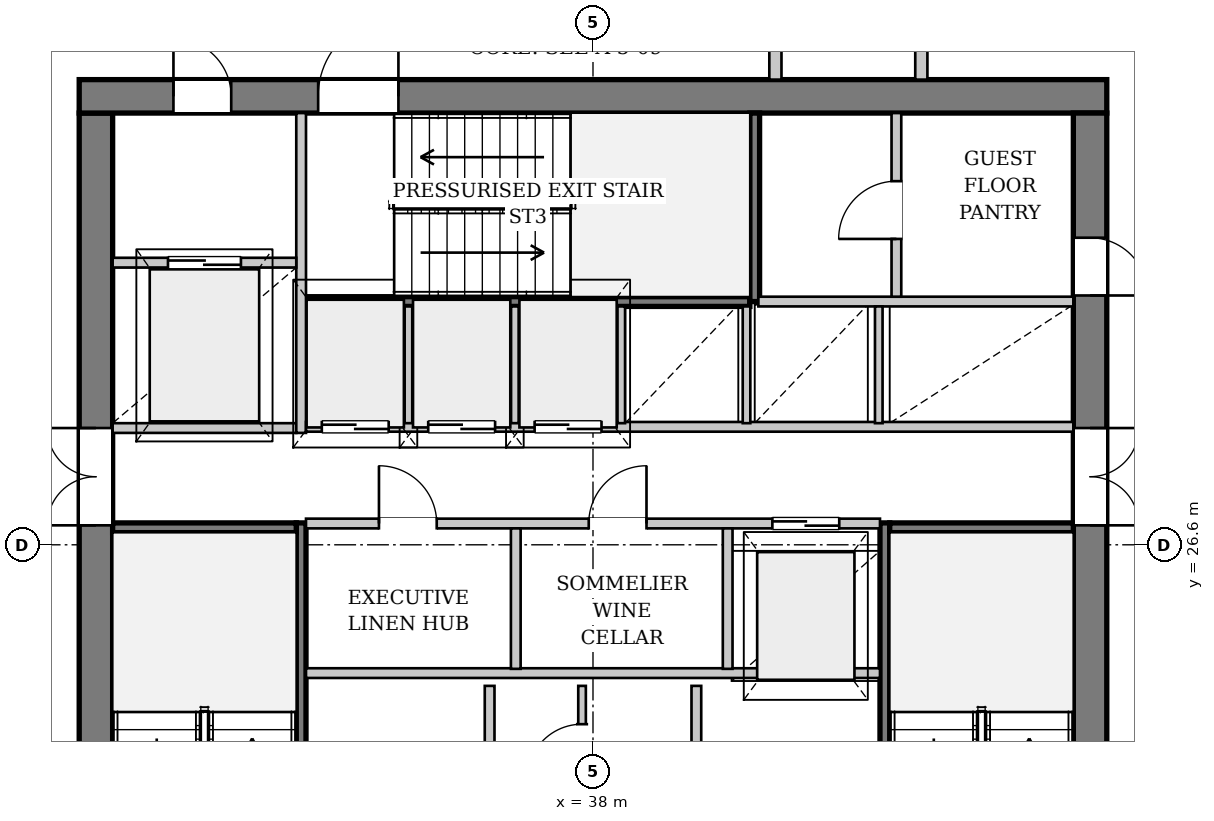
"""IFC4 building model, lengths in metres.
Left out: names, types, materials, properties, quantities, classifications, styles, units other than length and angle.
Written with IfcOpenShell. Run it as: python <this file> out.ifc"""

import sys

from ifc_helpers import new_model, si_unit, direction, frame, frame_2d, origin, place, context, subcontext, project, spatial, rectangle, extrude, source, transform, mapped, element, fill, save


model = new_model("IFC4")
c1 = context("Model", 3, precision=1e-05, world=origin(), true_north=direction((0.0, 1.0)))
c2 = subcontext(c1, "Body", "Model", "MODEL_VIEW")
j1 = project(units=[si_unit("LENGTHUNIT", "METRE"), si_unit("PLANEANGLEUNIT", "RADIAN")], contexts=[c1])
p1 = place(None, origin())
s1 = spatial("IfcSite", under=j1, at=p1, CompositionType="ELEMENT")
p2 = place(p1, origin())
s2 = spatial("IfcBuilding", under=s1, at=p2, CompositionType="ELEMENT")
p3 = place(p2, frame((0.0, 0.0, 185.65)))
s3 = spatial("IfcBuildingStorey", under=s2, at=p3, CompositionType="ELEMENT", Elevation=185.65)
p4 = place(p3, frame((29.825, 19.5, 0.0), z_axis=(0.0, 0.0, 1.0), x_axis=(0.0, 1.0, 0.0)))
e1 = element("IfcWall", 1, at=p4, inside=s3, PredefinedType="SHEAR", context=c2, shape_type="SweptSolid", body=[
    extrude(rectangle(XDim=14.2, YDim=0.55, at=frame_2d((7.1, 0.0))), origin(), (0.0, 0.0, 1.0), 3.33),
])
p5 = place(p4, frame((7.42, 0.0, 0.0)))
e2 = element("IfcOpeningElement", 2, at=p5, cuts=e1, PredefinedType="OPENING", context=c2, shape_type="SweptSolid", body=[
    extrude(rectangle(XDim=1.6, YDim=2.2, at=frame_2d((0.8, 1.1))), frame((0.0, 0.285, 0.0), z_axis=(0.0, -1.0, 0.0), x_axis=(1.0, 0.0, 0.0)), (0.0, 0.0, 1.0), 0.57),
])
p6 = place(p3, frame((29.55, 33.975, 0.0), z_axis=(0.0, 0.0, 1.0), x_axis=(1.0, 0.0, 0.0)))
e3 = element("IfcWall", 3, at=p6, inside=s3, PredefinedType="SHEAR", context=c2, shape_type="SweptSolid", body=[
    extrude(rectangle(XDim=16.9, YDim=0.55, at=frame_2d((8.45, 0.0))), origin(), (0.0, 0.0, 1.0), 3.33),
])
p7 = place(p6, frame((1.55, 0.0, 0.0)))
e4 = element("IfcOpeningElement", 4, at=p7, cuts=e3, PredefinedType="OPENING", context=c2, shape_type="SweptSolid", body=[
    extrude(rectangle(XDim=0.95, YDim=2.1, at=frame_2d((0.475, 1.05))), frame((0.0, 0.285, 0.0), z_axis=(0.0, -1.0, 0.0), x_axis=(1.0, 0.0, 0.0)), (0.0, 0.0, 1.0), 0.57),
])
p8 = place(p6, frame((3.93, 0.0, 0.0)))
e5 = element("IfcOpeningElement", 5, at=p8, cuts=e3, PredefinedType="OPENING", context=c2, shape_type="SweptSolid", body=[
    extrude(rectangle(XDim=1.32, YDim=2.2, at=frame_2d((0.66, 1.1))), frame((0.0, 0.285, 0.0), z_axis=(0.0, -1.0, 0.0), x_axis=(1.0, 0.0, 0.0)), (0.0, 0.0, 1.0), 0.57),
])
p9 = place(p3, frame((46.175, 33.7, 0.0), z_axis=(0.0, 0.0, 1.0), x_axis=(0.0, -1.0, 0.0)))
e6 = element("IfcWall", 6, at=p9, inside=s3, PredefinedType="SHEAR", context=c2, shape_type="SweptSolid", body=[
    extrude(rectangle(XDim=14.2, YDim=0.55, at=frame_2d((7.1, 0.0))), origin(), (0.0, 0.0, 1.0), 3.33),
])
p10 = place(p9, frame((5.18, 0.0, 0.0)))
e7 = element("IfcOpeningElement", 7, at=p10, cuts=e6, PredefinedType="OPENING", context=c2, shape_type="SweptSolid", body=[
    extrude(rectangle(XDim=1.6, YDim=2.2, at=frame_2d((0.8, 1.1))), frame((0.0, 0.285, 0.0), z_axis=(0.0, -1.0, 0.0), x_axis=(1.0, 0.0, 0.0)), (0.0, 0.0, 1.0), 0.57),
])
p11 = place(p9, frame((2.05, 0.0, 0.0)))
e8 = element("IfcOpeningElement", 8, at=p11, cuts=e6, PredefinedType="OPENING", context=c2, shape_type="SweptSolid", body=[
    extrude(rectangle(XDim=0.95, YDim=2.1, at=frame_2d((0.475, 1.05))), frame((0.0, 0.285, 0.0), z_axis=(0.0, -1.0, 0.0), x_axis=(1.0, 0.0, 0.0)), (0.0, 0.0, 1.0), 0.57),
])
p12 = place(p3, frame((33.2, 19.5, 0.0), z_axis=(0.0, 0.0, 1.0), x_axis=(0.0, 1.0, 0.0)))
e9 = element("IfcWall", 9, at=p12, inside=s3, PredefinedType="PARTITIONING", context=c2, shape_type="SweptSolid", body=[
    extrude(rectangle(XDim=7.46, YDim=0.16, at=frame_2d((3.73, 0.0))), origin(), (0.0, 0.0, 1.0), 3.33),
])
p13 = place(p12, frame((0.08, 0.0, 0.0)))
e10 = element("IfcOpeningElement", 10, at=p13, cuts=e9, PredefinedType="OPENING", context=c2, shape_type="SweptSolid", body=[
    extrude(rectangle(XDim=1.32, YDim=2.2, at=frame_2d((0.66, 1.1))), frame((0.0, 0.09, 0.0), z_axis=(0.0, -1.0, 0.0), x_axis=(1.0, 0.0, 0.0)), (0.0, 0.0, 1.0), 0.18),
])
p14 = place(p3, frame((30.1, 26.88, 0.0), z_axis=(0.0, 0.0, 1.0), x_axis=(1.0, 0.0, 0.0)))
e11 = element("IfcWall", 11, at=p14, inside=s3, PredefinedType="PARTITIONING", context=c2, shape_type="SweptSolid", body=[
    extrude(rectangle(XDim=3.02, YDim=0.16, at=frame_2d((1.51, 0.0))), origin(), (0.0, 0.0, 1.0), 3.33),
])
p15 = place(p3, frame((42.8, 26.96, 0.0), z_axis=(0.0, 0.0, 1.0), x_axis=(0.0, -1.0, 0.0)))
e12 = element("IfcWall", 12, at=p15, inside=s3, PredefinedType="PARTITIONING", context=c2, shape_type="SweptSolid", body=[
    extrude(rectangle(XDim=7.46, YDim=0.16, at=frame_2d((3.73, 0.0))), origin(), (0.0, 0.0, 1.0), 3.33),
])
p16 = place(p15, frame((6.06, 0.0, 0.0)))
e13 = element("IfcOpeningElement", 13, at=p16, cuts=e12, PredefinedType="OPENING", context=c2, shape_type="SweptSolid", body=[
    extrude(rectangle(XDim=1.32, YDim=2.2, at=frame_2d((0.66, 1.1))), frame((0.0, 0.09, 0.0), z_axis=(0.0, -1.0, 0.0), x_axis=(1.0, 0.0, 0.0)), (0.0, 0.0, 1.0), 0.18),
])
p17 = place(p3, frame((42.88, 26.88, 0.0), z_axis=(0.0, 0.0, 1.0), x_axis=(1.0, 0.0, 0.0)))
e14 = element("IfcWall", 14, at=p17, inside=s3, PredefinedType="PARTITIONING", context=c2, shape_type="SweptSolid", body=[
    extrude(rectangle(XDim=3.02, YDim=0.16, at=frame_2d((1.51, 0.0))), origin(), (0.0, 0.0, 1.0), 3.33),
])
p18 = place(p3, frame((33.28, 30.6, 0.0), z_axis=(0.0, 0.0, 1.0), x_axis=(1.0, 0.0, 0.0)))
e15 = element("IfcWall", 15, at=p18, inside=s3, PredefinedType="PARTITIONING", context=c2, shape_type="SweptSolid", body=[
    extrude(rectangle(XDim=7.3, YDim=0.16, at=frame_2d((3.65, 0.0))), origin(), (0.0, 0.0, 1.0), 3.33),
])
p19 = place(p3, frame((40.66, 30.6, 0.0), z_axis=(0.0, 0.0, 1.0), x_axis=(0.0, 1.0, 0.0)))
e16 = element("IfcWall", 16, at=p19, inside=s3, PredefinedType="PARTITIONING", context=c2, shape_type="SweptSolid", body=[
    extrude(rectangle(XDim=3.1, YDim=0.16, at=frame_2d((1.55, 0.0))), origin(), (0.0, 0.0, 1.0), 3.33),
])
p20 = place(p3, frame((36.3, 19.5, 0.0), z_axis=(0.0, 0.0, 1.0), x_axis=(0.0, 1.0, 0.0)))
e17 = element("IfcWall", 17, at=p20, inside=s3, PredefinedType="PARTITIONING", context=c2, shape_type="SweptSolid", body=[
    extrude(rectangle(XDim=4.78, YDim=0.16, at=frame_2d((2.39, 0.0))), origin(), (0.0, 0.0, 1.0), 3.33),
])
p21 = place(p20, frame((0.6, 0.0, 0.0)))
e18 = element("IfcOpeningElement", 18, at=p21, cuts=e17, PredefinedType="OPENING", context=c2, shape_type="SweptSolid", body=[
    extrude(rectangle(XDim=1.2, YDim=2.2, at=frame_2d((0.6, 1.1))), frame((0.0, 0.09, 0.0), z_axis=(0.0, -1.0, 0.0), x_axis=(1.0, 0.0, 0.0)), (0.0, 0.0, 1.0), 0.18),
])
p22 = place(p20, frame((2.65, 0.0, 0.0)))
e19 = element("IfcOpeningElement", 19, at=p22, cuts=e17, PredefinedType="OPENING", context=c2, shape_type="SweptSolid", body=[
    extrude(rectangle(XDim=0.95, YDim=2.1, at=frame_2d((0.475, 1.05))), frame((0.0, 0.09, 0.0), z_axis=(0.0, -1.0, 0.0), x_axis=(1.0, 0.0, 0.0)), (0.0, 0.0, 1.0), 0.18),
])
p23 = place(p3, frame((39.7, 24.28, 0.0), z_axis=(0.0, 0.0, 1.0), x_axis=(0.0, -1.0, 0.0)))
e20 = element("IfcWall", 20, at=p23, inside=s3, PredefinedType="PARTITIONING", context=c2, shape_type="SweptSolid", body=[
    extrude(rectangle(XDim=4.78, YDim=0.16, at=frame_2d((2.39, 0.0))), origin(), (0.0, 0.0, 1.0), 3.33),
])
p24 = place(p23, frame((3.12, 0.0, 0.0)))
e21 = element("IfcOpeningElement", 21, at=p24, cuts=e20, PredefinedType="OPENING", context=c2, shape_type="SweptSolid", body=[
    extrude(rectangle(XDim=1.2, YDim=2.2, at=frame_2d((0.6, 1.1))), frame((0.0, 0.09, 0.0), z_axis=(0.0, -1.0, 0.0), x_axis=(1.0, 0.0, 0.0)), (0.0, 0.0, 1.0), 0.18),
])
p25 = place(p3, frame((33.28, 24.49, 0.0), z_axis=(0.0, 0.0, 1.0), x_axis=(1.0, 0.0, 0.0)))
e22 = element("IfcWall", 22, at=p25, inside=s3, PredefinedType="PARTITIONING", context=c2, shape_type="SweptSolid", body=[
    extrude(rectangle(XDim=9.44, YDim=0.16, at=frame_2d((4.72, 0.0))), origin(), (0.0, 0.0, 1.0), 3.33),
])
p26 = place(p3, frame((37.82, 22.1, 0.0), z_axis=(0.0, 0.0, 1.0), x_axis=(0.0, 1.0, 0.0)))
e23 = element("IfcWall", 23, at=p26, inside=s3, PredefinedType="PARTITIONING", context=c2, shape_type="SweptSolid", body=[
    extrude(rectangle(XDim=2.18, YDim=0.125, at=frame_2d((1.09, 0.0))), origin(), (0.0, 0.0, 1.0), 3.33),
])
p27 = place(p26, frame((0.65, 0.0, 0.0)))
e24 = element("IfcOpeningElement", 24, at=p27, cuts=e23, PredefinedType="OPENING", context=c2, shape_type="SweptSolid", body=[
    extrude(rectangle(XDim=0.9, YDim=2.1, at=frame_2d((0.45, 1.05))), frame((0.0, 0.073, 0.0), z_axis=(0.0, -1.0, 0.0), x_axis=(1.0, 0.0, 0.0)), (0.0, 0.0, 1.0), 0.145),
])
p28 = place(p3, frame((30.1, 28.52, 0.0), z_axis=(0.0, 0.0, 1.0), x_axis=(1.0, 0.0, 0.0)))
e25 = element("IfcWall", 25, at=p28, inside=s3, PredefinedType="PARTITIONING", context=c2, shape_type="SweptSolid", body=[
    extrude(rectangle(XDim=3.02, YDim=0.16, at=frame_2d((1.51, 0.0))), origin(), (0.0, 0.0, 1.0), 3.33),
])
p29 = place(p3, frame((33.2, 28.44, 0.0), z_axis=(0.0, 0.0, 1.0), x_axis=(0.0, 1.0, 0.0)))
e26 = element("IfcWall", 26, at=p29, inside=s3, PredefinedType="PARTITIONING", context=c2, shape_type="SweptSolid", body=[
    extrude(rectangle(XDim=5.26, YDim=0.16, at=frame_2d((2.63, 0.0))), origin(), (0.0, 0.0, 1.0), 3.33),
])
p30 = place(p3, frame((30.1, 31.24, 0.0), z_axis=(0.0, 0.0, 1.0), x_axis=(1.0, 0.0, 0.0)))
e27 = element("IfcWall", 27, at=p30, inside=s3, PredefinedType="PARTITIONING", context=c2, shape_type="SweptSolid", body=[
    extrude(rectangle(XDim=3.02, YDim=0.16, at=frame_2d((1.51, 0.0))), origin(), (0.0, 0.0, 1.0), 3.33),
])
p31 = place(p30, frame((0.91, 0.0, 0.0)))
e28 = element("IfcOpeningElement", 28, at=p31, cuts=e27, PredefinedType="OPENING", context=c2, shape_type="SweptSolid", body=[
    extrude(rectangle(XDim=1.2, YDim=2.2, at=frame_2d((0.6, 1.1))), frame((0.0, 0.09, 0.0), z_axis=(0.0, -1.0, 0.0), x_axis=(1.0, 0.0, 0.0)), (0.0, 0.0, 1.0), 0.18),
])
p32 = place(p3, frame((33.28, 26.95, 0.0), z_axis=(0.0, 0.0, 1.0), x_axis=(1.0, 0.0, 0.0)))
e29 = element("IfcWall", 29, at=p32, inside=s3, PredefinedType="PARTITIONING", context=c2, shape_type="SweptSolid", body=[
    extrude(rectangle(XDim=9.44, YDim=0.16, at=frame_2d((4.72, 0.0))), origin(), (0.0, 0.0, 1.0), 3.33),
])
p33 = place(p32, frame((1.2, 0.0, 0.0)))
e30 = element("IfcOpeningElement", 30, at=p33, cuts=e29, PredefinedType="OPENING", context=c2, shape_type="SweptSolid", body=[
    extrude(rectangle(XDim=0.95, YDim=2.1, at=frame_2d((0.475, 1.05))), frame((0.0, 0.09, 0.0), z_axis=(0.0, -1.0, 0.0), x_axis=(1.0, 0.0, 0.0)), (0.0, 0.0, 1.0), 0.18),
])
p34 = place(p32, frame((4.65, 0.0, 0.0)))
e31 = element("IfcOpeningElement", 31, at=p34, cuts=e29, PredefinedType="OPENING", context=c2, shape_type="SweptSolid", body=[
    extrude(rectangle(XDim=0.95, YDim=2.1, at=frame_2d((0.475, 1.05))), frame((0.0, 0.09, 0.0), z_axis=(0.0, -1.0, 0.0), x_axis=(1.0, 0.0, 0.0)), (0.0, 0.0, 1.0), 0.18),
])
p35 = place(p32, frame((7.67, 0.0, 0.0)))
e32 = element("IfcOpeningElement", 32, at=p35, cuts=e29, PredefinedType="OPENING", context=c2, shape_type="SweptSolid", body=[
    extrude(rectangle(XDim=1.1, YDim=2.2, at=frame_2d((0.55, 1.1))), frame((0.0, 0.09, 0.0), z_axis=(0.0, -1.0, 0.0), x_axis=(1.0, 0.0, 0.0)), (0.0, 0.0, 1.0), 0.18),
])
for number, where, z_axis, x_axis in (
    (33, (36.73, 24.56, 0.0), (0.0, 0.0, 1.0), (0.0, 1.0, 0.0)),
    (34, (40.215, 24.56, 0.0), (0.0, 0.0, 1.0), (0.0, 1.0, 0.0)),
):
    element("IfcWall", number, at=place(p3, frame(where, z_axis=z_axis, x_axis=x_axis)), inside=s3, PredefinedType="PARTITIONING", context=c2, shape_type="SweptSolid", body=[
        extrude(rectangle(XDim=2.31, YDim=0.16, at=frame_2d((1.155, 0.0))), origin(), (0.0, 0.0, 1.0), 3.33),
    ])
p36 = place(p3, frame((33.28, 28.54, 0.0), z_axis=(0.0, 0.0, 1.0), x_axis=(1.0, 0.0, 0.0)))
e35 = element("IfcWall", 35, at=p36, inside=s3, PredefinedType="PARTITIONING", context=c2, shape_type="SweptSolid", body=[
    extrude(rectangle(XDim=12.62, YDim=0.16, at=frame_2d((6.31, 0.0))), origin(), (0.0, 0.0, 1.0), 3.33),
])
p37 = place(p36, frame((0.26, 0.0, 0.0)))
e36 = element("IfcOpeningElement", 36, at=p37, cuts=e35, PredefinedType="OPENING", context=c2, shape_type="SweptSolid", body=[
    extrude(rectangle(XDim=1.1, YDim=2.2, at=frame_2d((0.55, 1.1))), frame((0.0, 0.09, 0.0), z_axis=(0.0, -1.0, 0.0), x_axis=(1.0, 0.0, 0.0)), (0.0, 0.0, 1.0), 0.18),
])
p38 = place(p36, frame((2.01, 0.0, 0.0)))
e37 = element("IfcOpeningElement", 37, at=p38, cuts=e35, PredefinedType="OPENING", context=c2, shape_type="SweptSolid", body=[
    extrude(rectangle(XDim=1.1, YDim=2.2, at=frame_2d((0.55, 1.1))), frame((0.0, 0.09, 0.0), z_axis=(0.0, -1.0, 0.0), x_axis=(1.0, 0.0, 0.0)), (0.0, 0.0, 1.0), 0.18),
])
p39 = place(p36, frame((3.76, 0.0, 0.0)))
e38 = element("IfcOpeningElement", 38, at=p39, cuts=e35, PredefinedType="OPENING", context=c2, shape_type="SweptSolid", body=[
    extrude(rectangle(XDim=1.1, YDim=2.2, at=frame_2d((0.55, 1.1))), frame((0.0, 0.09, 0.0), z_axis=(0.0, -1.0, 0.0), x_axis=(1.0, 0.0, 0.0)), (0.0, 0.0, 1.0), 0.18),
])
p40 = place(p3, frame((40.72, 30.6, 0.0), z_axis=(0.0, 0.0, 1.0), x_axis=(1.0, 0.0, 0.0)))
e39 = element("IfcWall", 39, at=p40, inside=s3, PredefinedType="PARTITIONING", context=c2, shape_type="SweptSolid", body=[
    extrude(rectangle(XDim=5.18, YDim=0.16, at=frame_2d((2.59, 0.0))), origin(), (0.0, 0.0, 1.0), 3.33),
])
for number, where, z_axis, x_axis in (
    (40, (34.965, 28.6, 0.0), (0.0, 0.0, 1.0), (0.0, 1.0, 0.0)),
    (41, (36.715, 28.6, 0.0), (0.0, 0.0, 1.0), (0.0, 1.0, 0.0)),
    (42, (38.465, 28.6, 0.0), (0.0, 0.0, 1.0), (0.0, 1.0, 0.0)),
    (43, (40.525, 28.6, 0.0), (0.0, 0.0, 1.0), (0.0, 1.0, 0.0)),
    (44, (42.7, 28.6, 0.0), (0.0, 0.0, 1.0), (0.0, 1.0, 0.0)),
):
    element("IfcWall", number, at=place(p3, frame(where, z_axis=z_axis, x_axis=x_axis)), inside=s3, PredefinedType="PARTITIONING", context=c2, shape_type="SweptSolid", body=[
        extrude(rectangle(XDim=1.92, YDim=0.125, at=frame_2d((0.96, 0.0))), origin(), (0.0, 0.0, 1.0), 3.33),
    ])
p41 = place(p3, frame((42.99, 30.68, 0.0), z_axis=(0.0, 0.0, 1.0), x_axis=(0.0, 1.0, 0.0)))
e45 = element("IfcWall", 45, at=p41, inside=s3, PredefinedType="PARTITIONING", context=c2, shape_type="SweptSolid", body=[
    extrude(rectangle(XDim=3.02, YDim=0.16, at=frame_2d((1.51, 0.0))), origin(), (0.0, 0.0, 1.0), 3.33),
])
p42 = place(p41, frame((0.95, 0.0, 0.0)))
e46 = element("IfcOpeningElement", 46, at=p42, cuts=e45, PredefinedType="OPENING", context=c2, shape_type="SweptSolid", body=[
    extrude(rectangle(XDim=0.95, YDim=2.1, at=frame_2d((0.475, 1.05))), frame((0.0, 0.09, 0.0), z_axis=(0.0, -1.0, 0.0), x_axis=(1.0, 0.0, 0.0)), (0.0, 0.0, 1.0), 0.18),
])
for number, where, z_axis, x_axis in (
    (47, (41.0, 34.25, 0.0), (0.0, 0.0, 1.0), (0.0, 1.0, 0.0)),
    (48, (43.4, 34.25, 0.0), (0.0, 0.0, 1.0), (0.0, 1.0, 0.0)),
):
    element("IfcWall", number, at=place(p3, frame(where, z_axis=z_axis, x_axis=x_axis)), inside=s3, PredefinedType="PARTITIONING", context=c2, shape_type="SweptSolid", body=[
        extrude(rectangle(XDim=1.95, YDim=0.2, at=frame_2d((0.975, 0.0))), origin(), (0.0, 0.0, 1.0), 3.33),
    ])
m1 = source(origin(), c2, "Body", "SweptSolid", [
    extrude(rectangle(XDim=1.6, YDim=2.2, at=frame_2d((0.8, 1.1))), frame((0.0, 0.025, 0.0), z_axis=(0.0, -1.0, 0.0), x_axis=(1.0, 0.0, 0.0)), (0.0, 0.0, 1.0), 0.05),
])
p43 = place(p5, origin())
e49 = element("IfcDoor", 49, at=p43, inside=s3, OperationType="DOUBLE_DOOR_SINGLE_SWING", PredefinedType="DOOR", context=c2, shape_type="MappedRepresentation", body=[
    mapped(m1, transform((0.0, 0.0, 0.0), x_axis=(1.0, 0.0, 0.0), y_axis=(0.0, 1.0, 0.0), z_axis=(0.0, 0.0, 1.0), scale=1.0)),
])
fill(e2, e49)
m2 = source(origin(), c2, "Body", "SweptSolid", [
    extrude(rectangle(XDim=0.95, YDim=2.1, at=frame_2d((0.475, 1.05))), frame((0.0, 0.025, 0.0), z_axis=(0.0, -1.0, 0.0), x_axis=(1.0, 0.0, 0.0)), (0.0, 0.0, 1.0), 0.05),
])
p44 = place(p7, origin())
e50 = element("IfcDoor", 50, at=p44, inside=s3, OperationType="SINGLE_SWING_LEFT", PredefinedType="DOOR", context=c2, shape_type="MappedRepresentation", body=[
    mapped(m2, transform((0.0, 0.0, 0.0), x_axis=(1.0, 0.0, 0.0), y_axis=(0.0, 1.0, 0.0), z_axis=(0.0, 0.0, 1.0), scale=1.0)),
])
fill(e4, e50)
m3 = source(origin(), c2, "Body", "SweptSolid", [
    extrude(rectangle(XDim=1.32, YDim=2.2, at=frame_2d((0.66, 1.1))), frame((0.0, 0.025, 0.0), z_axis=(0.0, -1.0, 0.0), x_axis=(1.0, 0.0, 0.0)), (0.0, 0.0, 1.0), 0.05),
])
p45 = place(p8, origin())
e51 = element("IfcDoor", 51, at=p45, inside=s3, OperationType="SINGLE_SWING_RIGHT", PredefinedType="DOOR", context=c2, shape_type="MappedRepresentation", body=[
    mapped(m3, transform((0.0, 0.0, 0.0), x_axis=(1.0, 0.0, 0.0), y_axis=(0.0, 1.0, 0.0), z_axis=(0.0, 0.0, 1.0), scale=1.0)),
])
fill(e5, e51)
p46 = place(p10, origin())
e52 = element("IfcDoor", 52, at=p46, inside=s3, OperationType="DOUBLE_DOOR_SINGLE_SWING", PredefinedType="DOOR", context=c2, shape_type="MappedRepresentation", body=[
    mapped(m1, transform((0.0, 0.0, 0.0), x_axis=(1.0, 0.0, 0.0), y_axis=(0.0, 1.0, 0.0), z_axis=(0.0, 0.0, 1.0), scale=1.0)),
])
fill(e7, e52)
m4 = source(origin(), c2, "Body", "SweptSolid", [
    extrude(rectangle(XDim=0.9, YDim=2.1, at=frame_2d((0.45, 1.05))), frame((0.0, 0.025, 0.0), z_axis=(0.0, -1.0, 0.0), x_axis=(1.0, 0.0, 0.0)), (0.0, 0.0, 1.0), 0.05),
])
p47 = place(p27, origin())
e53 = element("IfcDoor", 53, at=p47, inside=s3, OperationType="SINGLE_SWING_LEFT", PredefinedType="DOOR", context=c2, shape_type="MappedRepresentation", body=[
    mapped(m4, transform((0.0, 0.0, 0.0), x_axis=(1.0, 0.0, 0.0), y_axis=(0.0, 1.0, 0.0), z_axis=(0.0, 0.0, 1.0), scale=1.0)),
])
fill(e24, e53)
m5 = source(origin(), c2, "Body", "SweptSolid", [
    extrude(rectangle(XDim=1.2, YDim=2.2, at=frame_2d((0.6, 1.1))), frame((0.0, 0.025, 0.0), z_axis=(0.0, -1.0, 0.0), x_axis=(1.0, 0.0, 0.0)), (0.0, 0.0, 1.0), 0.05),
])
p48 = place(p31, origin())
e54 = element("IfcDoor", 54, at=p48, inside=s3, OperationType="DOUBLE_DOOR_SLIDING", PredefinedType="DOOR", context=c2, shape_type="MappedRepresentation", body=[
    mapped(m5, transform((0.0, 0.0, 0.0), x_axis=(1.0, 0.0, 0.0), y_axis=(0.0, 1.0, 0.0), z_axis=(0.0, 0.0, 1.0), scale=1.0)),
])
fill(e28, e54)
p49 = place(p33, origin())
e55 = element("IfcDoor", 55, at=p49, inside=s3, OperationType="SINGLE_SWING_LEFT", PredefinedType="DOOR", context=c2, shape_type="MappedRepresentation", body=[
    mapped(m2, transform((0.0, 0.0, 0.0), x_axis=(1.0, 0.0, 0.0), y_axis=(0.0, 1.0, 0.0), z_axis=(0.0, 0.0, 1.0), scale=1.0)),
])
fill(e30, e55)
p50 = place(p34, origin())
e56 = element("IfcDoor", 56, at=p50, inside=s3, OperationType="SINGLE_SWING_RIGHT", PredefinedType="DOOR", context=c2, shape_type="MappedRepresentation", body=[
    mapped(m2, transform((0.0, 0.0, 0.0), x_axis=(1.0, 0.0, 0.0), y_axis=(0.0, 1.0, 0.0), z_axis=(0.0, 0.0, 1.0), scale=1.0)),
])
fill(e31, e56)
m6 = source(origin(), c2, "Body", "SweptSolid", [
    extrude(rectangle(XDim=1.1, YDim=2.2, at=frame_2d((0.55, 1.1))), frame((0.0, 0.025, 0.0), z_axis=(0.0, -1.0, 0.0), x_axis=(1.0, 0.0, 0.0)), (0.0, 0.0, 1.0), 0.05),
])
p51 = place(p35, origin())
e57 = element("IfcDoor", 57, at=p51, inside=s3, OperationType="DOUBLE_DOOR_SLIDING", PredefinedType="DOOR", context=c2, shape_type="MappedRepresentation", body=[
    mapped(m6, transform((0.0, 0.0, 0.0), x_axis=(1.0, 0.0, 0.0), y_axis=(0.0, 1.0, 0.0), z_axis=(0.0, 0.0, 1.0), scale=1.0)),
])
fill(e32, e57)
p52 = place(p37, origin())
e58 = element("IfcDoor", 58, at=p52, inside=s3, OperationType="DOUBLE_DOOR_SLIDING", PredefinedType="DOOR", context=c2, shape_type="MappedRepresentation", body=[
    mapped(m6, transform((0.0, 0.0, 0.0), x_axis=(1.0, 0.0, 0.0), y_axis=(0.0, 1.0, 0.0), z_axis=(0.0, 0.0, 1.0), scale=1.0)),
])
fill(e36, e58)
p53 = place(p38, origin())
e59 = element("IfcDoor", 59, at=p53, inside=s3, OperationType="DOUBLE_DOOR_SLIDING", PredefinedType="DOOR", context=c2, shape_type="MappedRepresentation", body=[
    mapped(m6, transform((0.0, 0.0, 0.0), x_axis=(1.0, 0.0, 0.0), y_axis=(0.0, 1.0, 0.0), z_axis=(0.0, 0.0, 1.0), scale=1.0)),
])
fill(e37, e59)
p54 = place(p39, origin())
e60 = element("IfcDoor", 60, at=p54, inside=s3, OperationType="DOUBLE_DOOR_SLIDING", PredefinedType="DOOR", context=c2, shape_type="MappedRepresentation", body=[
    mapped(m6, transform((0.0, 0.0, 0.0), x_axis=(1.0, 0.0, 0.0), y_axis=(0.0, 1.0, 0.0), z_axis=(0.0, 0.0, 1.0), scale=1.0)),
])
fill(e38, e60)
p55 = place(p42, origin())
e61 = element("IfcDoor", 61, at=p55, inside=s3, OperationType="SINGLE_SWING_LEFT", PredefinedType="DOOR", context=c2, shape_type="MappedRepresentation", body=[
    mapped(m2, transform((0.0, 0.0, 0.0), x_axis=(1.0, 0.0, 0.0), y_axis=(0.0, 1.0, 0.0), z_axis=(0.0, 0.0, 1.0), scale=1.0)),
])
fill(e46, e61)
p56 = place(p11, origin())
e62 = element("IfcDoor", 62, at=p56, inside=s3, OperationType="SINGLE_SWING_RIGHT", PredefinedType="DOOR", context=c2, shape_type="MappedRepresentation", body=[
    mapped(m2, transform((0.0, 0.0, 0.0), x_axis=(1.0, 0.0, 0.0), y_axis=(0.0, 1.0, 0.0), z_axis=(0.0, 0.0, 1.0), scale=1.0)),
])
fill(e8, e62)
save(model, sys.argv[1])
